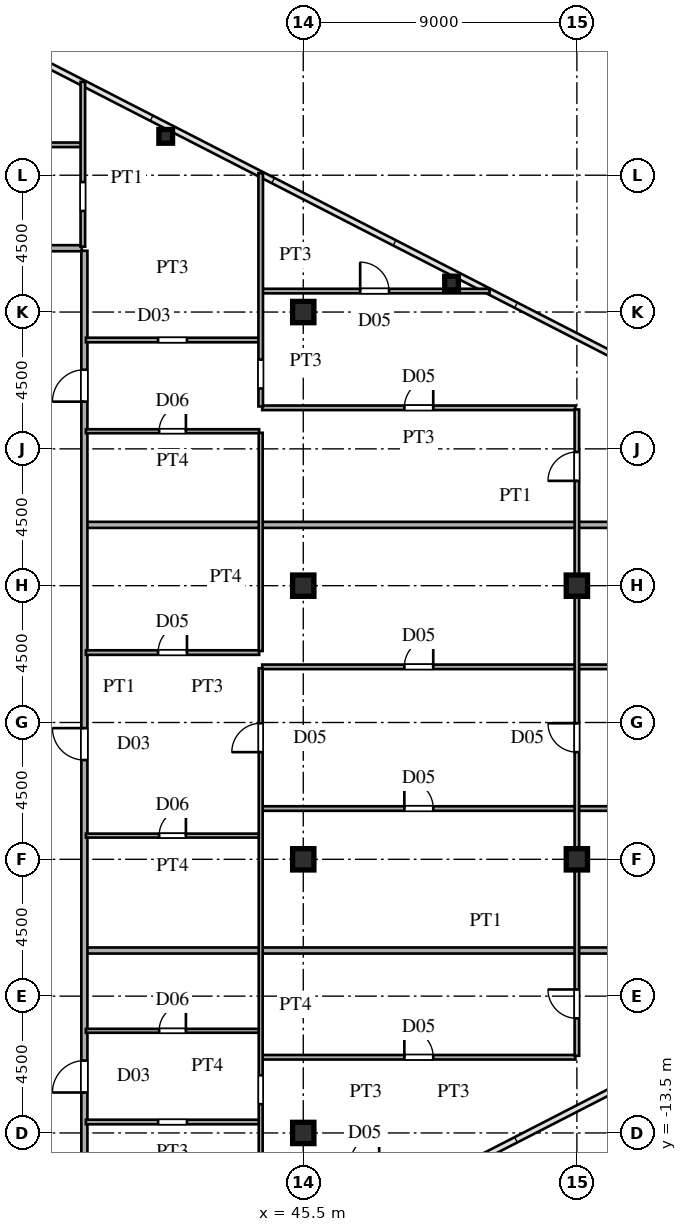
"""IFC4 building model, lengths in metres.
Left out: names, types, materials, properties, quantities, classifications, styles, units other than length and angle.
Written with IfcOpenShell. Run it as: python <this file> out.ifc"""

import sys

from ifc_helpers import new_model, si_unit, direction, frame, frame_2d, origin, origin_2d, place, context, subcontext, project, spatial, rectangle, hollow_rectangle, i_section, extrude, source, transform, mapped, element, fill, save


model = new_model("IFC4")
c1 = context("Model", 3, precision=1e-05, world=origin(), true_north=direction((0.0, 1.0)))
c2 = subcontext(c1, "Body", "Model", "MODEL_VIEW")
j1 = project(units=[si_unit("LENGTHUNIT", "METRE"), si_unit("PLANEANGLEUNIT", "RADIAN")], contexts=[c1])
p1 = place(None, origin())
s1 = spatial("IfcSite", under=j1, at=p1, CompositionType="ELEMENT")
p2 = place(p1, origin())
s2 = spatial("IfcBuilding", under=s1, at=p2, CompositionType="ELEMENT")
p3 = place(p2, frame((0.0, 0.0, 110.4)))
s3 = spatial("IfcBuildingStorey", under=s2, at=p3, CompositionType="ELEMENT", Elevation=110.4)
m1 = source(origin(), c2, "Body", "SweptSolid", [
    extrude(i_section(OverallWidth=0.7, OverallDepth=0.7, WebThickness=0.028, FlangeThickness=0.045, at=origin_2d()), origin(), (0.0, 0.0, 1.0), 3.6),
])
for number, where, z_axis, x_axis in (
    (1, (45.5, -13.5, 0.0), (0.0, 0.0, 1.0), (1.0, 0.0, 0.0)),
    (2, (45.5, -4.5, 0.0), (0.0, 0.0, 1.0), (1.0, 0.0, 0.0)),
    (3, (45.5, 4.5, 0.0), (0.0, 0.0, 1.0), (1.0, 0.0, 0.0)),
    (4, (45.5, 13.5, 0.0), (0.0, 0.0, 1.0), (1.0, 0.0, 0.0)),
    (5, (54.5, -4.5, 0.0), (0.0, 0.0, 1.0), (1.0, 0.0, 0.0)),
    (6, (54.5, 4.5, 0.0), (0.0, 0.0, 1.0), (1.0, 0.0, 0.0)),
):
    element("IfcColumn", number, at=place(p3, frame(where, z_axis=z_axis, x_axis=x_axis)), inside=s3, PredefinedType="COLUMN", context=c2, shape_type="MappedRepresentation", body=[
        mapped(m1, transform((0.0, 0.0, 0.0), scale=1.0)),
    ])
m2 = source(origin(), c2, "Body", "SweptSolid", [
    extrude(hollow_rectangle(XDim=0.45, YDim=0.45, WallThickness=0.018, at=origin_2d()), origin(), (0.0, 0.0, 1.0), 3.6),
])
for number, where, z_axis, x_axis in (
    (7, (40.976, 19.278, 0.0), (0.0, 0.0, 1.0), (1.0, 0.0, 0.0)),
    (8, (50.377, 14.453, 0.0), (0.0, 0.0, 1.0), (1.0, 0.0, 0.0)),
):
    element("IfcColumn", number, at=place(p3, frame(where, z_axis=z_axis, x_axis=x_axis)), inside=s3, PredefinedType="COLUMN", context=c2, shape_type="MappedRepresentation", body=[
        mapped(m2, transform((0.0, 0.0, 0.0), scale=1.0)),
    ])
p4 = place(p3, frame((38.35, -13.14, 0.0), z_axis=(0.0, 0.0, 1.0), x_axis=(1.0, 0.0, 0.0)))
e9 = element("IfcWall", 9, at=p4, inside=s3, PredefinedType="PARTITIONING", context=c2, shape_type="SweptSolid", body=[
    extrude(rectangle(XDim=5.7, YDim=0.15, at=frame_2d((2.85, 0.0))), origin(), (0.0, 0.0, 1.0), 3.38),
])
p5 = place(p4, frame((2.375, 0.0, 0.0)))
e10 = element("IfcOpeningElement", 10, at=p5, cuts=e9, PredefinedType="OPENING", context=c2, shape_type="SweptSolid", body=[
    extrude(rectangle(XDim=0.95, YDim=2.15, at=frame_2d((0.475, 1.075))), frame((0.0, 0.085, 0.0), z_axis=(0.0, -1.0, 0.0), x_axis=(1.0, 0.0, 0.0)), (0.0, 0.0, 1.0), 0.17),
])
p6 = place(p3, frame((44.15, -11.01, 0.0), z_axis=(0.0, 0.0, 1.0), x_axis=(1.0, 0.0, 0.0)))
e11 = element("IfcWall", 11, at=p6, inside=s3, PredefinedType="PARTITIONING", context=c2, shape_type="SweptSolid", body=[
    extrude(rectangle(XDim=10.3, YDim=0.15, at=frame_2d((5.15, 0.0))), origin(), (0.0, 0.0, 1.0), 3.38),
])
p7 = place(p6, frame((4.675, 0.0, 0.0)))
e12 = element("IfcOpeningElement", 12, at=p7, cuts=e11, PredefinedType="OPENING", context=c2, shape_type="SweptSolid", body=[
    extrude(rectangle(XDim=0.95, YDim=2.15, at=frame_2d((0.475, 1.075))), frame((0.0, 0.085, 0.0), z_axis=(0.0, -1.0, 0.0), x_axis=(1.0, 0.0, 0.0)), (0.0, 0.0, 1.0), 0.17),
])
p8 = place(p3, frame((38.35, -10.14, 0.0), z_axis=(0.0, 0.0, 1.0), x_axis=(1.0, 0.0, 0.0)))
e13 = element("IfcWall", 13, at=p8, inside=s3, PredefinedType="PARTITIONING", context=c2, shape_type="SweptSolid", body=[
    extrude(rectangle(XDim=5.7, YDim=0.13, at=frame_2d((2.85, 0.0))), origin(), (0.0, 0.0, 1.0), 3.38),
])
p9 = place(p8, frame((2.41, 0.0, 0.0)))
e14 = element("IfcOpeningElement", 14, at=p9, cuts=e13, PredefinedType="OPENING", context=c2, shape_type="SweptSolid", body=[
    extrude(rectangle(XDim=0.88, YDim=2.1, at=frame_2d((0.44, 1.05))), frame((0.0, 0.075, 0.0), z_axis=(0.0, -1.0, 0.0), x_axis=(1.0, 0.0, 0.0)), (0.0, 0.0, 1.0), 0.15),
])
p10 = place(p3, frame((38.38, -7.5, 0.0), z_axis=(0.0, 0.0, 1.0), x_axis=(1.0, 0.0, 0.0)))
e15 = element("IfcWall", 15, at=p10, inside=s3, PredefinedType="PARTITIONING", context=c2, shape_type="SweptSolid", body=[
    extrude(rectangle(XDim=26.259, YDim=0.2, at=frame_2d((13.129, 0.0))), origin(), (0.0, 0.0, 1.0), 3.38),
])
p11 = place(p3, frame((38.35, -3.72, 0.0), z_axis=(0.0, 0.0, 1.0), x_axis=(1.0, 0.0, 0.0)))
e16 = element("IfcWall", 16, at=p11, inside=s3, PredefinedType="PARTITIONING", context=c2, shape_type="SweptSolid", body=[
    extrude(rectangle(XDim=5.7, YDim=0.13, at=frame_2d((2.85, 0.0))), origin(), (0.0, 0.0, 1.0), 3.38),
])
p12 = place(p11, frame((2.41, 0.0, 0.0)))
e17 = element("IfcOpeningElement", 17, at=p12, cuts=e16, PredefinedType="OPENING", context=c2, shape_type="SweptSolid", body=[
    extrude(rectangle(XDim=0.88, YDim=2.1, at=frame_2d((0.44, 1.05))), frame((0.0, 0.075, 0.0), z_axis=(0.0, -1.0, 0.0), x_axis=(1.0, 0.0, 0.0)), (0.0, 0.0, 1.0), 0.15),
])
p13 = place(p3, frame((44.15, -2.83, 0.0), z_axis=(0.0, 0.0, 1.0), x_axis=(1.0, 0.0, 0.0)))
e18 = element("IfcWall", 18, at=p13, inside=s3, PredefinedType="PARTITIONING", context=c2, shape_type="SweptSolid", body=[
    extrude(rectangle(XDim=25.385, YDim=0.15, at=frame_2d((12.692, 0.0))), origin(), (0.0, 0.0, 1.0), 3.38),
])
p14 = place(p13, frame((4.675, 0.0, 0.0)))
e19 = element("IfcOpeningElement", 19, at=p14, cuts=e18, PredefinedType="OPENING", context=c2, shape_type="SweptSolid", body=[
    extrude(rectangle(XDim=0.95, YDim=2.15, at=frame_2d((0.475, 1.075))), frame((0.0, 0.085, 0.0), z_axis=(0.0, -1.0, 0.0), x_axis=(1.0, 0.0, 0.0)), (0.0, 0.0, 1.0), 0.17),
])
p15 = place(p13, frame((12.725, 0.0, 0.0)))
e20 = element("IfcOpeningElement", 20, at=p15, cuts=e18, PredefinedType="OPENING", context=c2, shape_type="SweptSolid", body=[
    extrude(rectangle(XDim=0.95, YDim=2.15, at=frame_2d((0.475, 1.075))), frame((0.0, 0.085, 0.0), z_axis=(0.0, -1.0, 0.0), x_axis=(1.0, 0.0, 0.0)), (0.0, 0.0, 1.0), 0.17),
])
p16 = place(p3, frame((44.15, 1.83, 0.0), z_axis=(0.0, 0.0, 1.0), x_axis=(1.0, 0.0, 0.0)))
e21 = element("IfcWall", 21, at=p16, inside=s3, PredefinedType="PARTITIONING", context=c2, shape_type="SweptSolid", body=[
    extrude(rectangle(XDim=25.385, YDim=0.15, at=frame_2d((12.692, 0.0))), origin(), (0.0, 0.0, 1.0), 3.38),
])
p17 = place(p16, frame((4.675, 0.0, 0.0)))
e22 = element("IfcOpeningElement", 22, at=p17, cuts=e21, PredefinedType="OPENING", context=c2, shape_type="SweptSolid", body=[
    extrude(rectangle(XDim=0.95, YDim=2.15, at=frame_2d((0.475, 1.075))), frame((0.0, 0.085, 0.0), z_axis=(0.0, -1.0, 0.0), x_axis=(1.0, 0.0, 0.0)), (0.0, 0.0, 1.0), 0.17),
])
p18 = place(p16, frame((12.725, 0.0, 0.0)))
e23 = element("IfcOpeningElement", 23, at=p18, cuts=e21, PredefinedType="OPENING", context=c2, shape_type="SweptSolid", body=[
    extrude(rectangle(XDim=0.95, YDim=2.15, at=frame_2d((0.475, 1.075))), frame((0.0, 0.085, 0.0), z_axis=(0.0, -1.0, 0.0), x_axis=(1.0, 0.0, 0.0)), (0.0, 0.0, 1.0), 0.17),
])
p19 = place(p3, frame((38.35, 2.3, 0.0), z_axis=(0.0, 0.0, 1.0), x_axis=(1.0, 0.0, 0.0)))
e24 = element("IfcWall", 24, at=p19, inside=s3, PredefinedType="PARTITIONING", context=c2, shape_type="SweptSolid", body=[
    extrude(rectangle(XDim=5.7, YDim=0.15, at=frame_2d((2.85, 0.0))), origin(), (0.0, 0.0, 1.0), 3.38),
])
p20 = place(p19, frame((2.375, 0.0, 0.0)))
e25 = element("IfcOpeningElement", 25, at=p20, cuts=e24, PredefinedType="OPENING", context=c2, shape_type="SweptSolid", body=[
    extrude(rectangle(XDim=0.95, YDim=2.15, at=frame_2d((0.475, 1.075))), frame((0.0, 0.085, 0.0), z_axis=(0.0, -1.0, 0.0), x_axis=(1.0, 0.0, 0.0)), (0.0, 0.0, 1.0), 0.17),
])
p21 = place(p3, frame((38.38, 6.5, 0.0), z_axis=(0.0, 0.0, 1.0), x_axis=(1.0, 0.0, 0.0)))
e26 = element("IfcWall", 26, at=p21, inside=s3, PredefinedType="PARTITIONING", context=c2, shape_type="SweptSolid", body=[
    extrude(rectangle(XDim=28.208, YDim=0.2, at=frame_2d((14.104, 0.0))), origin(), (0.0, 0.0, 1.0), 3.38),
])
p22 = place(p3, frame((38.35, 9.58, 0.0), z_axis=(0.0, 0.0, 1.0), x_axis=(1.0, 0.0, 0.0)))
e27 = element("IfcWall", 27, at=p22, inside=s3, PredefinedType="PARTITIONING", context=c2, shape_type="SweptSolid", body=[
    extrude(rectangle(XDim=5.7, YDim=0.13, at=frame_2d((2.85, 0.0))), origin(), (0.0, 0.0, 1.0), 3.38),
])
p23 = place(p22, frame((2.41, 0.0, 0.0)))
e28 = element("IfcOpeningElement", 28, at=p23, cuts=e27, PredefinedType="OPENING", context=c2, shape_type="SweptSolid", body=[
    extrude(rectangle(XDim=0.88, YDim=2.1, at=frame_2d((0.44, 1.05))), frame((0.0, 0.075, 0.0), z_axis=(0.0, -1.0, 0.0), x_axis=(1.0, 0.0, 0.0)), (0.0, 0.0, 1.0), 0.15),
])
p24 = place(p3, frame((44.15, 10.35, 0.0), z_axis=(0.0, 0.0, 1.0), x_axis=(1.0, 0.0, 0.0)))
e29 = element("IfcWall", 29, at=p24, inside=s3, PredefinedType="PARTITIONING", context=c2, shape_type="SweptSolid", body=[
    extrude(rectangle(XDim=10.3, YDim=0.15, at=frame_2d((5.15, 0.0))), origin(), (0.0, 0.0, 1.0), 3.38),
])
p25 = place(p24, frame((4.675, 0.0, 0.0)))
e30 = element("IfcOpeningElement", 30, at=p25, cuts=e29, PredefinedType="OPENING", context=c2, shape_type="SweptSolid", body=[
    extrude(rectangle(XDim=0.95, YDim=2.15, at=frame_2d((0.475, 1.075))), frame((0.0, 0.085, 0.0), z_axis=(0.0, -1.0, 0.0), x_axis=(1.0, 0.0, 0.0)), (0.0, 0.0, 1.0), 0.17),
])
p26 = place(p3, frame((38.35, 12.58, 0.0), z_axis=(0.0, 0.0, 1.0), x_axis=(1.0, 0.0, 0.0)))
e31 = element("IfcWall", 31, at=p26, inside=s3, PredefinedType="PARTITIONING", context=c2, shape_type="SweptSolid", body=[
    extrude(rectangle(XDim=5.7, YDim=0.15, at=frame_2d((2.85, 0.0))), origin(), (0.0, 0.0, 1.0), 3.38),
])
p27 = place(p26, frame((2.375, 0.0, 0.0)))
e32 = element("IfcOpeningElement", 32, at=p27, cuts=e31, PredefinedType="OPENING", context=c2, shape_type="SweptSolid", body=[
    extrude(rectangle(XDim=0.95, YDim=2.15, at=frame_2d((0.475, 1.075))), frame((0.0, 0.085, 0.0), z_axis=(0.0, -1.0, 0.0), x_axis=(1.0, 0.0, 0.0)), (0.0, 0.0, 1.0), 0.17),
])
p28 = place(p3, frame((44.15, 14.19, 0.0), z_axis=(0.0, 0.0, 1.0), x_axis=(1.0, 0.0, 0.0)))
e33 = element("IfcWall", 33, at=p28, inside=s3, PredefinedType="PARTITIONING", context=c2, shape_type="SweptSolid", body=[
    extrude(rectangle(XDim=7.477, YDim=0.15, at=frame_2d((3.739, 0.0))), origin(), (0.0, 0.0, 1.0), 2.78),
])
p29 = place(p28, frame((3.221, 0.0, 0.0)))
e34 = element("IfcOpeningElement", 34, at=p29, cuts=e33, PredefinedType="OPENING", context=c2, shape_type="SweptSolid", body=[
    extrude(rectangle(XDim=0.95, YDim=2.15, at=frame_2d((0.475, 1.075))), frame((0.0, 0.085, 0.0), z_axis=(0.0, -1.0, 0.0), x_axis=(1.0, 0.0, 0.0)), (0.0, 0.0, 1.0), 0.17),
])
p30 = place(p3, frame((36.585, 15.6, 0.0), z_axis=(0.0, 0.0, 1.0), x_axis=(1.0, 0.0, 0.0)))
e35 = element("IfcWall", 35, at=p30, inside=s3, PredefinedType="PARTITIONING", context=c2, shape_type="SweptSolid", body=[
    extrude(rectangle(XDim=1.63, YDim=0.2, at=frame_2d((0.815, 0.0))), origin(), (0.0, 0.0, 1.0), 3.38),
])
p31 = place(p3, frame((27.465, 19.0, 0.0), z_axis=(0.0, 0.0, 1.0), x_axis=(1.0, 0.0, 0.0)))
e36 = element("IfcWall", 36, at=p31, inside=s3, PredefinedType="PARTITIONING", context=c2, shape_type="SweptSolid", body=[
    extrude(rectangle(XDim=10.735, YDim=0.15, at=frame_2d((5.367, 0.0))), origin(), (0.0, 0.0, 1.0), 3.38),
])
p32 = place(p31, frame((4.935, 0.0, 0.0)))
e37 = element("IfcOpeningElement", 37, at=p32, cuts=e36, PredefinedType="OPENING", context=c2, shape_type="SweptSolid", body=[
    extrude(rectangle(XDim=0.95, YDim=2.15, at=frame_2d((0.475, 1.075))), frame((0.0, 0.085, 0.0), z_axis=(0.0, -1.0, 0.0), x_axis=(1.0, 0.0, 0.0)), (0.0, 0.0, 1.0), 0.17),
])
p33 = place(p3, frame((38.25, 15.65, 0.0), z_axis=(0.0, 0.0, 1.0), x_axis=(0.0, 1.0, 0.0)))
e38 = element("IfcWall", 38, at=p33, inside=s3, PredefinedType="PARTITIONING", context=c2, shape_type="SweptSolid", body=[
    extrude(rectangle(XDim=5.421, YDim=0.15, at=frame_2d((2.71, 0.0))), origin(), (0.0, 0.0, 1.0), 3.38),
])
p34 = place(p33, frame((1.175, 0.0, 0.0)))
e39 = element("IfcOpeningElement", 39, at=p34, cuts=e38, PredefinedType="OPENING", context=c2, shape_type="SweptSolid", body=[
    extrude(rectangle(XDim=0.95, YDim=2.15, at=frame_2d((0.475, 1.075))), frame((0.0, 0.085, 0.0), z_axis=(0.0, -1.0, 0.0), x_axis=(1.0, 0.0, 0.0)), (0.0, 0.0, 1.0), 0.17),
])
p35 = place(p3, frame((38.3, -15.515, 0.0), z_axis=(0.0, 0.0, 1.0), x_axis=(0.0, 1.0, 0.0)))
e40 = element("IfcWall", 40, at=p35, inside=s3, PredefinedType="PARTITIONING", context=c2, shape_type="SweptSolid", body=[
    extrude(rectangle(XDim=31.03, YDim=0.2, at=frame_2d((15.515, 0.0))), origin(), (0.0, 0.0, 1.0), 3.38),
])
p36 = place(p35, frame((3.345, 0.0, 0.0)))
e41 = element("IfcOpeningElement", 41, at=p36, cuts=e40, PredefinedType="OPENING", context=c2, shape_type="SweptSolid", body=[
    extrude(rectangle(XDim=1.05, YDim=2.25, at=frame_2d((0.525, 1.125))), frame((0.0, 0.11, 0.0), z_axis=(0.0, -1.0, 0.0), x_axis=(1.0, 0.0, 0.0)), (0.0, 0.0, 1.0), 0.22),
])
p37 = place(p35, frame((14.28, 0.0, 0.0)))
e42 = element("IfcOpeningElement", 42, at=p37, cuts=e40, PredefinedType="OPENING", context=c2, shape_type="SweptSolid", body=[
    extrude(rectangle(XDim=1.05, YDim=2.25, at=frame_2d((0.525, 1.125))), frame((0.0, 0.11, 0.0), z_axis=(0.0, -1.0, 0.0), x_axis=(1.0, 0.0, 0.0)), (0.0, 0.0, 1.0), 0.22),
])
p38 = place(p35, frame((26.067, 0.0, 0.0)))
e43 = element("IfcOpeningElement", 43, at=p38, cuts=e40, PredefinedType="OPENING", context=c2, shape_type="SweptSolid", body=[
    extrude(rectangle(XDim=1.05, YDim=2.25, at=frame_2d((0.525, 1.125))), frame((0.0, 0.11, 0.0), z_axis=(0.0, -1.0, 0.0), x_axis=(1.0, 0.0, 0.0)), (0.0, 0.0, 1.0), 0.22),
])
p39 = place(p3, frame((44.1, -18.069, 0.0), z_axis=(0.0, 0.0, 1.0), x_axis=(0.0, 1.0, 0.0)))
e44 = element("IfcWall", 44, at=p39, inside=s3, PredefinedType="PARTITIONING", context=c2, shape_type="SweptSolid", body=[
    extrude(rectangle(XDim=19.852, YDim=0.13, at=frame_2d((9.926, 0.0))), origin(), (0.0, 0.0, 1.0), 3.38),
])
p40 = place(p39, frame((5.516, 0.0, 0.0)))
e45 = element("IfcOpeningElement", 45, at=p40, cuts=e44, PredefinedType="OPENING", context=c2, shape_type="SweptSolid", body=[
    extrude(rectangle(XDim=0.95, YDim=2.15, at=frame_2d((0.475, 1.075))), frame((0.0, 0.075, 0.0), z_axis=(0.0, -1.0, 0.0), x_axis=(1.0, 0.0, 0.0)), (0.0, 0.0, 1.0), 0.15),
])
p41 = place(p39, frame((17.094, 0.0, 0.0)))
e46 = element("IfcOpeningElement", 46, at=p41, cuts=e44, PredefinedType="OPENING", context=c2, shape_type="SweptSolid", body=[
    extrude(rectangle(XDim=0.95, YDim=2.15, at=frame_2d((0.475, 1.075))), frame((0.0, 0.075, 0.0), z_axis=(0.0, -1.0, 0.0), x_axis=(1.0, 0.0, 0.0)), (0.0, 0.0, 1.0), 0.15),
])
p42 = place(p3, frame((44.1, 2.352, 0.0), z_axis=(0.0, 0.0, 1.0), x_axis=(0.0, 1.0, 0.0)))
e47 = element("IfcWall", 47, at=p42, inside=s3, PredefinedType="PARTITIONING", context=c2, shape_type="SweptSolid", body=[
    extrude(rectangle(XDim=7.176, YDim=0.13, at=frame_2d((3.588, 0.0))), origin(), (0.0, 0.0, 1.0), 3.38),
])
p43 = place(p3, frame((44.1, 10.395, 0.0), z_axis=(0.0, 0.0, 1.0), x_axis=(0.0, 1.0, 0.0)))
e48 = element("IfcWall", 48, at=p43, inside=s3, PredefinedType="PARTITIONING", context=c2, shape_type="SweptSolid", body=[
    extrude(rectangle(XDim=7.674, YDim=0.15, at=frame_2d((3.837, 0.0))), origin(), (0.0, 0.0, 1.0), 3.38),
])
p44 = place(p43, frame((0.591, 0.0, 0.0)))
e49 = element("IfcOpeningElement", 49, at=p44, cuts=e48, PredefinedType="OPENING", context=c2, shape_type="SweptSolid", body=[
    extrude(rectangle(XDim=0.95, YDim=2.15, at=frame_2d((0.475, 1.075))), frame((0.0, 0.085, 0.0), z_axis=(0.0, -1.0, 0.0), x_axis=(1.0, 0.0, 0.0)), (0.0, 0.0, 1.0), 0.17),
])
p45 = place(p3, frame((54.5, -10.961, 0.0), z_axis=(0.0, 0.0, 1.0), x_axis=(0.0, 1.0, 0.0)))
e50 = element("IfcWall", 50, at=p45, inside=s3, PredefinedType="PARTITIONING", context=c2, shape_type="SweptSolid", body=[
    extrude(rectangle(XDim=21.256, YDim=0.15, at=frame_2d((10.628, 0.0))), origin(), (0.0, 0.0, 1.0), 2.78),
])
p46 = place(p45, frame((1.23, 0.0, 0.0)))
e51 = element("IfcOpeningElement", 51, at=p46, cuts=e50, PredefinedType="OPENING", context=c2, shape_type="SweptSolid", body=[
    extrude(rectangle(XDim=0.95, YDim=2.15, at=frame_2d((0.475, 1.075))), frame((0.0, 0.085, 0.0), z_axis=(0.0, -1.0, 0.0), x_axis=(1.0, 0.0, 0.0)), (0.0, 0.0, 1.0), 0.17),
])
p47 = place(p45, frame((9.986, 0.0, 0.0)))
e52 = element("IfcOpeningElement", 52, at=p47, cuts=e50, PredefinedType="OPENING", context=c2, shape_type="SweptSolid", body=[
    extrude(rectangle(XDim=0.95, YDim=2.15, at=frame_2d((0.475, 1.075))), frame((0.0, 0.085, 0.0), z_axis=(0.0, -1.0, 0.0), x_axis=(1.0, 0.0, 0.0)), (0.0, 0.0, 1.0), 0.17),
])
p48 = place(p45, frame((18.908, 0.0, 0.0)))
e53 = element("IfcOpeningElement", 53, at=p48, cuts=e50, PredefinedType="OPENING", context=c2, shape_type="SweptSolid", body=[
    extrude(rectangle(XDim=0.95, YDim=2.15, at=frame_2d((0.475, 1.075))), frame((0.0, 0.085, 0.0), z_axis=(0.0, -1.0, 0.0), x_axis=(1.0, 0.0, 0.0)), (0.0, 0.0, 1.0), 0.17),
])
m3 = source(origin(), c2, "Body", "SweptSolid", [
    extrude(rectangle(XDim=0.95, YDim=2.15, at=frame_2d((0.475, 1.075))), frame((0.0, 0.025, 0.0), z_axis=(0.0, -1.0, 0.0), x_axis=(1.0, 0.0, 0.0)), (0.0, 0.0, 1.0), 0.05),
])
p49 = place(p7, origin())
e54 = element("IfcDoor", 54, at=p49, inside=s3, OperationType="SINGLE_SWING_LEFT", PredefinedType="DOOR", context=c2, shape_type="MappedRepresentation", body=[
    mapped(m3, transform((0.0, 0.0, 0.0), scale=1.0)),
])
fill(e12, e54)
m4 = source(origin(), c2, "Body", "SweptSolid", [
    extrude(rectangle(XDim=0.88, YDim=2.1, at=frame_2d((0.44, 1.05))), frame((0.0, 0.025, 0.0), z_axis=(0.0, -1.0, 0.0), x_axis=(1.0, 0.0, 0.0)), (0.0, 0.0, 1.0), 0.05),
])
p50 = place(p9, origin())
e55 = element("IfcDoor", 55, at=p50, inside=s3, OperationType="SINGLE_SWING_RIGHT", PredefinedType="DOOR", context=c2, shape_type="MappedRepresentation", body=[
    mapped(m4, transform((0.0, 0.0, 0.0), scale=1.0)),
])
fill(e14, e55)
p51 = place(p12, origin())
e56 = element("IfcDoor", 56, at=p51, inside=s3, OperationType="SINGLE_SWING_RIGHT", PredefinedType="DOOR", context=c2, shape_type="MappedRepresentation", body=[
    mapped(m4, transform((0.0, 0.0, 0.0), scale=1.0)),
])
fill(e17, e56)
p52 = place(p14, origin())
e57 = element("IfcDoor", 57, at=p52, inside=s3, OperationType="SINGLE_SWING_LEFT", PredefinedType="DOOR", context=c2, shape_type="MappedRepresentation", body=[
    mapped(m3, transform((0.0, 0.0, 0.0), scale=1.0)),
])
fill(e19, e57)
p53 = place(p17, origin())
e58 = element("IfcDoor", 58, at=p53, inside=s3, OperationType="SINGLE_SWING_RIGHT", PredefinedType="DOOR", context=c2, shape_type="MappedRepresentation", body=[
    mapped(m3, transform((0.0, 0.0, 0.0), scale=1.0)),
])
fill(e22, e58)
p54 = place(p20, origin())
e59 = element("IfcDoor", 59, at=p54, inside=s3, OperationType="SINGLE_SWING_RIGHT", PredefinedType="DOOR", context=c2, shape_type="MappedRepresentation", body=[
    mapped(m3, transform((0.0, 0.0, 0.0), scale=1.0)),
])
fill(e25, e59)
p55 = place(p23, origin())
e60 = element("IfcDoor", 60, at=p55, inside=s3, OperationType="SINGLE_SWING_RIGHT", PredefinedType="DOOR", context=c2, shape_type="MappedRepresentation", body=[
    mapped(m4, transform((0.0, 0.0, 0.0), scale=1.0)),
])
fill(e28, e60)
p56 = place(p25, origin())
e61 = element("IfcDoor", 61, at=p56, inside=s3, OperationType="SINGLE_SWING_RIGHT", PredefinedType="DOOR", context=c2, shape_type="MappedRepresentation", body=[
    mapped(m3, transform((0.0, 0.0, 0.0), scale=1.0)),
])
fill(e30, e61)
p57 = place(p29, origin())
e62 = element("IfcDoor", 62, at=p57, inside=s3, OperationType="SINGLE_SWING_LEFT", PredefinedType="DOOR", context=c2, shape_type="MappedRepresentation", body=[
    mapped(m3, transform((0.0, 0.0, 0.0), scale=1.0)),
])
fill(e34, e62)
m5 = source(origin(), c2, "Body", "SweptSolid", [
    extrude(rectangle(XDim=1.05, YDim=2.25, at=frame_2d((0.525, 1.125))), frame((0.0, 0.025, 0.0), z_axis=(0.0, -1.0, 0.0), x_axis=(1.0, 0.0, 0.0)), (0.0, 0.0, 1.0), 0.05),
])
p58 = place(p36, origin())
e63 = element("IfcDoor", 63, at=p58, inside=s3, OperationType="SINGLE_SWING_LEFT", PredefinedType="DOOR", context=c2, shape_type="MappedRepresentation", body=[
    mapped(m5, transform((0.0, 0.0, 0.0), scale=1.0)),
])
fill(e41, e63)
p59 = place(p37, origin())
e64 = element("IfcDoor", 64, at=p59, inside=s3, OperationType="SINGLE_SWING_RIGHT", PredefinedType="DOOR", context=c2, shape_type="MappedRepresentation", body=[
    mapped(m5, transform((0.0, 0.0, 0.0), scale=1.0)),
])
fill(e42, e64)
p60 = place(p38, origin())
e65 = element("IfcDoor", 65, at=p60, inside=s3, OperationType="SINGLE_SWING_LEFT", PredefinedType="DOOR", context=c2, shape_type="MappedRepresentation", body=[
    mapped(m5, transform((0.0, 0.0, 0.0), scale=1.0)),
])
fill(e43, e65)
p61 = place(p41, origin())
e66 = element("IfcDoor", 66, at=p61, inside=s3, OperationType="SINGLE_SWING_LEFT", PredefinedType="DOOR", context=c2, shape_type="MappedRepresentation", body=[
    mapped(m3, transform((0.0, 0.0, 0.0), scale=1.0)),
])
fill(e46, e66)
p62 = place(p46, origin())
e67 = element("IfcDoor", 67, at=p62, inside=s3, OperationType="SINGLE_SWING_RIGHT", PredefinedType="DOOR", context=c2, shape_type="MappedRepresentation", body=[
    mapped(m3, transform((0.0, 0.0, 0.0), scale=1.0)),
])
fill(e51, e67)
p63 = place(p47, origin())
e68 = element("IfcDoor", 68, at=p63, inside=s3, OperationType="SINGLE_SWING_RIGHT", PredefinedType="DOOR", context=c2, shape_type="MappedRepresentation", body=[
    mapped(m3, transform((0.0, 0.0, 0.0), scale=1.0)),
])
fill(e52, e68)
p64 = place(p48, origin())
e69 = element("IfcDoor", 69, at=p64, inside=s3, OperationType="SINGLE_SWING_LEFT", PredefinedType="DOOR", context=c2, shape_type="MappedRepresentation", body=[
    mapped(m3, transform((0.0, 0.0, 0.0), scale=1.0)),
])
fill(e53, e69)
save(model, sys.argv[1])
